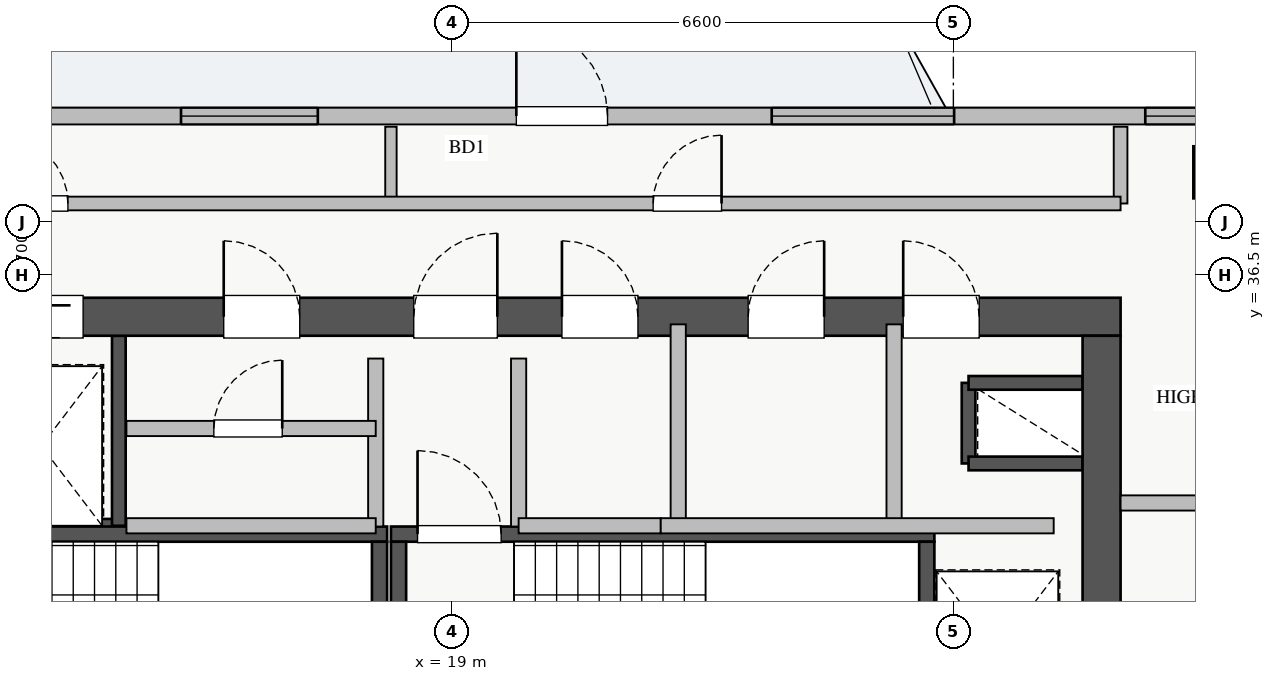
"""IFC4 building model, lengths in metres.
Left out: names, types, materials, properties, quantities, classifications, styles, units other than length and angle.
Written with IfcOpenShell. Run it as: python <this file> out.ifc"""

import sys

from ifc_helpers import new_model, si_unit, direction, frame, frame_2d, origin, origin_2d, place, context, subcontext, project, spatial, rectangle, extrude, source, transform, mapped, element, fill, save


model = new_model("IFC4")
c1 = context("Model", 3, precision=1e-05, world=origin(), true_north=direction((0.0, 1.0)))
c2 = subcontext(c1, "Body", "Model", "MODEL_VIEW")
j1 = project(units=[si_unit("LENGTHUNIT", "METRE"), si_unit("PLANEANGLEUNIT", "RADIAN")], contexts=[c1])
p1 = place(None, origin())
s1 = spatial("IfcSite", under=j1, at=p1, CompositionType="ELEMENT")
p2 = place(p1, origin())
s2 = spatial("IfcBuilding", under=s1, at=p2, CompositionType="ELEMENT")
p3 = place(p2, frame((0.0, 0.0, 250.25)))
s3 = spatial("IfcBuildingStorey", under=s2, at=p3, CompositionType="ELEMENT", Elevation=250.25)
p4 = place(p3, frame((12.68, 33.2, 0.0), z_axis=(0.0, 0.0, 1.0), x_axis=(1.0, 0.0, 0.0)))
e1 = element("IfcWall", 1, at=p4, inside=s3, PredefinedType="SHEAR", context=c2, shape_type="SweptSolid", body=[
    extrude(rectangle(XDim=1.94, YDim=0.18, at=frame_2d((0.97, 0.0))), origin(), (0.0, 0.0, 1.0), 3.07),
])
p5 = place(p3, frame((14.62, 33.2, 0.0), z_axis=(0.0, 0.0, 1.0), x_axis=(0.0, 1.0, 0.0)))
e2 = element("IfcWall", 2, at=p5, inside=s3, PredefinedType="SHEAR", context=c2, shape_type="SweptSolid", body=[
    extrude(rectangle(XDim=2.5, YDim=0.18, at=frame_2d((1.25, 0.0))), origin(), (0.0, 0.0, 1.0), 3.07),
])
p6 = place(p3, frame((25.8, 34.02, 0.0), z_axis=(0.0, 0.0, 1.0), x_axis=(0.0, 1.0, 0.0)))
e3 = element("IfcWall", 3, at=p6, inside=s3, PredefinedType="SHEAR", context=c2, shape_type="SweptSolid", body=[
    extrude(rectangle(XDim=1.06, YDim=0.18, at=frame_2d((0.53, 0.0))), origin(), (0.0, 0.0, 1.0), 3.07),
])
for number, where, z_axis, x_axis in (
    (4, (25.8, 35.08, 0.0), (0.0, 0.0, 1.0), (1.0, 0.0, 0.0)),
    (5, (25.8, 34.02, 0.0), (0.0, 0.0, 1.0), (1.0, 0.0, 0.0)),
):
    element("IfcWall", number, at=place(p3, frame(where, z_axis=z_axis, x_axis=x_axis)), inside=s3, PredefinedType="SHEAR", context=c2, shape_type="SweptSolid", body=[
        extrude(rectangle(XDim=1.5, YDim=0.18, at=frame_2d((0.75, 0.0))), origin(), (0.0, 0.0, 1.0), 3.07),
    ])
p7 = place(p3, frame((10.7, 33.09, 0.0), z_axis=(0.0, 0.0, 1.0), x_axis=(1.0, 0.0, 0.0)))
e6 = element("IfcWall", 6, at=p7, inside=s3, PredefinedType="SHEAR", context=c2, shape_type="SweptSolid", body=[
    extrude(rectangle(XDim=7.45, YDim=0.2, at=frame_2d((3.725, 0.0))), origin(), (0.0, 0.0, 1.0), 3.25),
])
p8 = place(p7, frame((0.35, 0.0, 0.0)))
e7 = element("IfcOpeningElement", 7, at=p8, cuts=e6, PredefinedType="OPENING", context=c2, shape_type="SweptSolid", body=[
    extrude(rectangle(XDim=1.1, YDim=2.05, at=frame_2d((0.55, 1.025))), frame((0.0, 0.11, 0.0), z_axis=(0.0, -1.0, 0.0), x_axis=(1.0, 0.0, 0.0)), (0.0, 0.0, 1.0), 0.22),
])
p9 = place(p3, frame((18.05, 30.05, 0.0), z_axis=(0.0, 0.0, 1.0), x_axis=(0.0, 1.0, 0.0)))
e8 = element("IfcWall", 8, at=p9, inside=s3, PredefinedType="SHEAR", context=c2, shape_type="SweptSolid", body=[
    extrude(rectangle(XDim=2.94, YDim=0.2, at=frame_2d((1.47, 0.0))), origin(), (0.0, 0.0, 1.0), 3.25),
])
p10 = place(p3, frame((18.2, 33.09, 0.0), z_axis=(0.0, 0.0, 1.0), x_axis=(1.0, 0.0, 0.0)))
e9 = element("IfcWall", 9, at=p10, inside=s3, PredefinedType="SHEAR", context=c2, shape_type="SweptSolid", body=[
    extrude(rectangle(XDim=7.15, YDim=0.2, at=frame_2d((3.575, 0.0))), origin(), (0.0, 0.0, 1.0), 3.25),
])
p11 = place(p10, frame((0.35, 0.0, 0.0)))
e10 = element("IfcOpeningElement", 10, at=p11, cuts=e9, PredefinedType="OPENING", context=c2, shape_type="SweptSolid", body=[
    extrude(rectangle(XDim=1.1, YDim=2.05, at=frame_2d((0.55, 1.025))), frame((0.0, 0.11, 0.0), z_axis=(0.0, -1.0, 0.0), x_axis=(1.0, 0.0, 0.0)), (0.0, 0.0, 1.0), 0.22),
])
for number, where, z_axis, x_axis in (
    (11, (18.3, 30.05, 0.0), (0.0, 0.0, 1.0), (0.0, 1.0, 0.0)),
    (12, (25.25, 30.05, 0.0), (0.0, 0.0, 1.0), (0.0, 1.0, 0.0)),
):
    element("IfcWall", number, at=place(p3, frame(where, z_axis=z_axis, x_axis=x_axis)), inside=s3, PredefinedType="SHEAR", context=c2, shape_type="SweptSolid", body=[
        extrude(rectangle(XDim=2.94, YDim=0.2, at=frame_2d((1.47, 0.0))), origin(), (0.0, 0.0, 1.0), 3.25),
    ])
p12 = place(p3, frame((10.2, 35.95, 0.0), z_axis=(0.0, 0.0, 1.0), x_axis=(1.0, 0.0, 0.0)))
e13 = element("IfcWall", 13, at=p12, inside=s3, PredefinedType="SHEAR", context=c2, shape_type="SweptSolid", body=[
    extrude(rectangle(XDim=17.6, YDim=0.5, at=frame_2d((8.8, 0.0))), origin(), (0.0, 0.0, 1.0), 3.25),
])
p13 = place(p12, frame((1.15, 0.0, 0.0)))
e14 = element("IfcOpeningElement", 14, at=p13, cuts=e13, PredefinedType="OPENING", context=c2, shape_type="SweptSolid", body=[
    extrude(rectangle(XDim=1.1, YDim=2.05, at=frame_2d((0.55, 1.025))), frame((0.0, 0.26, 0.0), z_axis=(0.0, -1.0, 0.0), x_axis=(1.0, 0.0, 0.0)), (0.0, 0.0, 1.0), 0.52),
])
p14 = place(p12, frame((8.3, 0.0, 0.0)))
e15 = element("IfcOpeningElement", 15, at=p14, cuts=e13, PredefinedType="OPENING", context=c2, shape_type="SweptSolid", body=[
    extrude(rectangle(XDim=1.1, YDim=2.05, at=frame_2d((0.55, 1.025))), frame((0.0, 0.26, 0.0), z_axis=(0.0, -1.0, 0.0), x_axis=(1.0, 0.0, 0.0)), (0.0, 0.0, 1.0), 0.52),
])
p15 = place(p12, frame((2.85, 0.0, 0.0)))
e16 = element("IfcOpeningElement", 16, at=p15, cuts=e13, PredefinedType="OPENING", context=c2, shape_type="SweptSolid", body=[
    extrude(rectangle(XDim=1.1, YDim=2.05, at=frame_2d((0.55, 1.025))), frame((0.0, 0.26, 0.0), z_axis=(0.0, -1.0, 0.0), x_axis=(1.0, 0.0, 0.0)), (0.0, 0.0, 1.0), 0.52),
])
p16 = place(p12, frame((5.8, 0.0, 0.0)))
e17 = element("IfcOpeningElement", 17, at=p16, cuts=e13, PredefinedType="OPENING", context=c2, shape_type="SweptSolid", body=[
    extrude(rectangle(XDim=1.0, YDim=2.05, at=frame_2d((0.5, 1.025))), frame((0.0, 0.26, 0.0), z_axis=(0.0, -1.0, 0.0), x_axis=(1.0, 0.0, 0.0)), (0.0, 0.0, 1.0), 0.52),
])
p17 = place(p12, frame((14.74, 0.0, 0.0)))
e18 = element("IfcOpeningElement", 18, at=p17, cuts=e13, PredefinedType="OPENING", context=c2, shape_type="SweptSolid", body=[
    extrude(rectangle(XDim=1.0, YDim=2.05, at=frame_2d((0.5, 1.025))), frame((0.0, 0.26, 0.0), z_axis=(0.0, -1.0, 0.0), x_axis=(1.0, 0.0, 0.0)), (0.0, 0.0, 1.0), 0.52),
])
p18 = place(p12, frame((10.25, 0.0, 0.0)))
e19 = element("IfcOpeningElement", 19, at=p18, cuts=e13, PredefinedType="OPENING", context=c2, shape_type="SweptSolid", body=[
    extrude(rectangle(XDim=1.0, YDim=2.05, at=frame_2d((0.5, 1.025))), frame((0.0, 0.26, 0.0), z_axis=(0.0, -1.0, 0.0), x_axis=(1.0, 0.0, 0.0)), (0.0, 0.0, 1.0), 0.52),
])
p19 = place(p12, frame((12.7, 0.0, 0.0)))
e20 = element("IfcOpeningElement", 20, at=p19, cuts=e13, PredefinedType="OPENING", context=c2, shape_type="SweptSolid", body=[
    extrude(rectangle(XDim=1.0, YDim=2.05, at=frame_2d((0.5, 1.025))), frame((0.0, 0.26, 0.0), z_axis=(0.0, -1.0, 0.0), x_axis=(1.0, 0.0, 0.0)), (0.0, 0.0, 1.0), 0.52),
])
p20 = place(p3, frame((27.55, 29.5, 0.0), z_axis=(0.0, 0.0, 1.0), x_axis=(0.0, 1.0, 0.0)))
e21 = element("IfcWall", 21, at=p20, inside=s3, PredefinedType="SHEAR", context=c2, shape_type="SweptSolid", body=[
    extrude(rectangle(XDim=6.2, YDim=0.5, at=frame_2d((3.1, 0.0))), origin(), (0.0, 0.0, 1.0), 3.25),
])
p21 = place(p20, frame((1.1, 0.0, 0.0)))
e22 = element("IfcOpeningElement", 22, at=p21, cuts=e21, PredefinedType="OPENING", context=c2, shape_type="SweptSolid", body=[
    extrude(rectangle(XDim=1.3, YDim=2.05, at=frame_2d((0.65, 1.025))), frame((0.0, 0.26, 0.0), z_axis=(0.0, -1.0, 0.0), x_axis=(1.0, 0.0, 0.0)), (0.0, 0.0, 1.0), 0.52),
])
m1 = source(origin(), c2, "Body", "SweptSolid", [
    extrude(rectangle(XDim=0.65, YDim=0.65, at=origin_2d()), origin(), (0.0, 0.0, 1.0), 3.25),
])
p22 = place(p3, frame((29.1, 37.85, 0.0), z_axis=(0.0, 0.0, 1.0), x_axis=(1.0, 0.0, 0.0)))
e23 = element("IfcColumn", 23, at=p22, inside=s3, PredefinedType="COLUMN", context=c2, shape_type="MappedRepresentation", body=[
    mapped(m1, transform((0.0, 0.0, 0.0), x_axis=(1.0, 0.0, 0.0), y_axis=(0.0, 1.0, 0.0), z_axis=(0.0, 0.0, 1.0), scale=1.0)),
])
p23 = place(p3, frame((8.35, 38.59, 0.0), z_axis=(0.0, 0.0, 1.0), x_axis=(1.0, 0.0, 0.0)))
e24 = element("IfcWall", 24, at=p23, inside=s3, PredefinedType="STANDARD", context=c2, shape_type="SweptSolid", body=[
    extrude(rectangle(XDim=21.3, YDim=0.22, at=frame_2d((10.65, 0.0))), origin(), (0.0, 0.0, 1.0), 2.61),
])
p24 = place(p23, frame((11.5, 0.0, 0.0)))
e25 = element("IfcOpeningElement", 25, at=p24, cuts=e24, PredefinedType="OPENING", context=c2, shape_type="SweptSolid", body=[
    extrude(rectangle(XDim=1.2, YDim=2.1, at=frame_2d((0.6, 1.05))), frame((0.0, 0.12, 0.0), z_axis=(0.0, -1.0, 0.0), x_axis=(1.0, 0.0, 0.0)), (0.0, 0.0, 1.0), 0.24),
])
p25 = place(p23, frame((1.463, 0.0, 0.9)))
e26 = element("IfcOpeningElement", 26, at=p25, cuts=e24, PredefinedType="OPENING", context=c2, shape_type="SweptSolid", body=[
    extrude(rectangle(XDim=2.4, YDim=1.48, at=frame_2d((1.2, 0.74))), frame((0.0, 0.12, 0.0), z_axis=(0.0, -1.0, 0.0), x_axis=(1.0, 0.0, 0.0)), (0.0, 0.0, 1.0), 0.24),
])
p26 = place(p23, frame((7.088, 0.0, 0.9)))
e27 = element("IfcOpeningElement", 27, at=p26, cuts=e24, PredefinedType="OPENING", context=c2, shape_type="SweptSolid", body=[
    extrude(rectangle(XDim=1.8, YDim=1.45, at=frame_2d((0.9, 0.725))), frame((0.0, 0.12, 0.0), z_axis=(0.0, -1.0, 0.0), x_axis=(1.0, 0.0, 0.0)), (0.0, 0.0, 1.0), 0.24),
])
p27 = place(p23, frame((19.775, 0.0, 0.9)))
e28 = element("IfcOpeningElement", 28, at=p27, cuts=e24, PredefinedType="OPENING", context=c2, shape_type="SweptSolid", body=[
    extrude(rectangle(XDim=1.2, YDim=1.4, at=frame_2d((0.6, 0.7))), frame((0.0, 0.12, 0.0), z_axis=(0.0, -1.0, 0.0), x_axis=(1.0, 0.0, 0.0)), (0.0, 0.0, 1.0), 0.24),
])
p28 = place(p23, frame((14.86, 0.0, 0.9)))
e29 = element("IfcOpeningElement", 29, at=p28, cuts=e24, PredefinedType="OPENING", context=c2, shape_type="SweptSolid", body=[
    extrude(rectangle(XDim=2.4, YDim=1.5, at=frame_2d((1.2, 0.75))), frame((0.0, 0.12, 0.0), z_axis=(0.0, -1.0, 0.0), x_axis=(1.0, 0.0, 0.0)), (0.0, 0.0, 1.0), 0.24),
])
p29 = place(p3, frame((27.8, 33.5, 0.0), z_axis=(0.0, 0.0, 1.0), x_axis=(1.0, 0.0, 0.0)))
e30 = element("IfcWall", 30, at=p29, inside=s3, PredefinedType="PARTITIONING", context=c2, shape_type="SweptSolid", body=[
    extrude(rectangle(XDim=3.1, YDim=0.2, at=frame_2d((1.55, 0.0))), origin(), (0.0, 0.0, 1.0), 3.07),
])
for number, where, z_axis, x_axis in (
    (31, (18.0, 33.19, 0.0), (0.0, 0.0, 1.0), (0.0, 1.0, 0.0)),
    (32, (19.88, 33.19, 0.0), (0.0, 0.0, 1.0), (0.0, 1.0, 0.0)),
):
    element("IfcWall", number, at=place(p3, frame(where, z_axis=z_axis, x_axis=x_axis)), inside=s3, PredefinedType="PARTITIONING", context=c2, shape_type="SweptSolid", body=[
        extrude(rectangle(XDim=2.21, YDim=0.2, at=frame_2d((1.105, 0.0))), origin(), (0.0, 0.0, 1.0), 3.07),
    ])
p30 = place(p3, frame((14.72, 34.48, 0.0), z_axis=(0.0, 0.0, 1.0), x_axis=(1.0, 0.0, 0.0)))
e33 = element("IfcWall", 33, at=p30, inside=s3, PredefinedType="PARTITIONING", context=c2, shape_type="SweptSolid", body=[
    extrude(rectangle(XDim=3.28, YDim=0.2, at=frame_2d((1.64, 0.0))), origin(), (0.0, 0.0, 1.0), 3.07),
])
p31 = place(p30, frame((1.15, 0.0, 0.0)))
e34 = element("IfcOpeningElement", 34, at=p31, cuts=e33, PredefinedType="OPENING", context=c2, shape_type="SweptSolid", body=[
    extrude(rectangle(XDim=0.9, YDim=2.05, at=frame_2d((0.45, 1.025))), frame((0.0, 0.11, 0.0), z_axis=(0.0, -1.0, 0.0), x_axis=(1.0, 0.0, 0.0)), (0.0, 0.0, 1.0), 0.22),
])
p32 = place(p3, frame((14.72, 33.2, 0.0), z_axis=(0.0, 0.0, 1.0), x_axis=(1.0, 0.0, 0.0)))
e35 = element("IfcWall", 35, at=p32, inside=s3, PredefinedType="PARTITIONING", context=c2, shape_type="SweptSolid", body=[
    extrude(rectangle(XDim=3.28, YDim=0.2, at=frame_2d((1.64, 0.0))), origin(), (0.0, 0.0, 1.0), 3.07),
])
p33 = place(p3, frame((24.82, 33.2, 0.0), z_axis=(0.0, 0.0, 1.0), x_axis=(0.0, 1.0, 0.0)))
e36 = element("IfcWall", 36, at=p33, inside=s3, PredefinedType="PARTITIONING", context=c2, shape_type="SweptSolid", body=[
    extrude(rectangle(XDim=2.65, YDim=0.2, at=frame_2d((1.325, 0.0))), origin(), (0.0, 0.0, 1.0), 3.07),
])
p34 = place(p3, frame((19.88, 33.2, 0.0), z_axis=(0.0, 0.0, 1.0), x_axis=(1.0, 0.0, 0.0)))
e37 = element("IfcWall", 37, at=p34, inside=s3, PredefinedType="PARTITIONING", context=c2, shape_type="SweptSolid", body=[
    extrude(rectangle(XDim=1.87, YDim=0.2, at=frame_2d((0.935, 0.0))), origin(), (0.0, 0.0, 1.0), 3.07),
])
p35 = place(p3, frame((21.98, 33.2, 0.0), z_axis=(0.0, 0.0, 1.0), x_axis=(0.0, 1.0, 0.0)))
e38 = element("IfcWall", 38, at=p35, inside=s3, PredefinedType="PARTITIONING", context=c2, shape_type="SweptSolid", body=[
    extrude(rectangle(XDim=2.65, YDim=0.2, at=frame_2d((1.325, 0.0))), origin(), (0.0, 0.0, 1.0), 3.07),
])
p36 = place(p3, frame((21.75, 33.2, 0.0), z_axis=(0.0, 0.0, 1.0), x_axis=(1.0, 0.0, 0.0)))
e39 = element("IfcWall", 39, at=p36, inside=s3, PredefinedType="PARTITIONING", context=c2, shape_type="SweptSolid", body=[
    extrude(rectangle(XDim=5.17, YDim=0.2, at=frame_2d((2.585, 0.0))), origin(), (0.0, 0.0, 1.0), 3.07),
])
p37 = place(p3, frame((27.8, 37.44, 0.0), z_axis=(0.0, 0.0, 1.0), x_axis=(0.0, 1.0, 0.0)))
e40 = element("IfcWall", 40, at=p37, inside=s3, PredefinedType="PARTITIONING", context=c2, shape_type="SweptSolid", body=[
    extrude(rectangle(XDim=1.01, YDim=0.18, at=frame_2d((0.505, 0.0))), origin(), (0.0, 0.0, 1.0), 3.07),
])
p38 = place(p3, frame((18.2, 37.44, 0.0), z_axis=(0.0, 0.0, 1.0), x_axis=(0.0, 1.0, 0.0)))
e41 = element("IfcWall", 41, at=p38, inside=s3, PredefinedType="PARTITIONING", context=c2, shape_type="SweptSolid", body=[
    extrude(rectangle(XDim=1.01, YDim=0.15, at=frame_2d((0.505, 0.0))), origin(), (0.0, 0.0, 1.0), 3.07),
])
p39 = place(p3, frame((8.85, 37.44, 0.0), z_axis=(0.0, 0.0, 1.0), x_axis=(1.0, 0.0, 0.0)))
e42 = element("IfcWall", 42, at=p39, inside=s3, PredefinedType="PARTITIONING", context=c2, shape_type="SweptSolid", body=[
    extrude(rectangle(XDim=18.95, YDim=0.18, at=frame_2d((9.475, 0.0))), origin(), (0.0, 0.0, 1.0), 3.07),
])
p40 = place(p39, frame((4.2, 0.0, 0.0)))
e43 = element("IfcOpeningElement", 43, at=p40, cuts=e42, PredefinedType="OPENING", context=c2, shape_type="SweptSolid", body=[
    extrude(rectangle(XDim=0.9, YDim=2.05, at=frame_2d((0.45, 1.025))), frame((0.0, 0.1, 0.0), z_axis=(0.0, -1.0, 0.0), x_axis=(1.0, 0.0, 0.0)), (0.0, 0.0, 1.0), 0.2),
])
p41 = place(p39, frame((12.8, 0.0, 0.0)))
e44 = element("IfcOpeningElement", 44, at=p41, cuts=e42, PredefinedType="OPENING", context=c2, shape_type="SweptSolid", body=[
    extrude(rectangle(XDim=0.9, YDim=2.05, at=frame_2d((0.45, 1.025))), frame((0.0, 0.1, 0.0), z_axis=(0.0, -1.0, 0.0), x_axis=(1.0, 0.0, 0.0)), (0.0, 0.0, 1.0), 0.2),
])
m2 = source(origin(), c2, "Body", "SweptSolid", [
    extrude(rectangle(XDim=1.2, YDim=2.1, at=frame_2d((0.6, 1.05))), frame((0.0, 0.025, 0.0), z_axis=(0.0, -1.0, 0.0), x_axis=(1.0, 0.0, 0.0)), (0.0, 0.0, 1.0), 0.05),
])
p42 = place(p24, origin())
e45 = element("IfcDoor", 45, at=p42, inside=s3, OperationType="SINGLE_SWING_LEFT", PredefinedType="DOOR", context=c2, shape_type="MappedRepresentation", body=[
    mapped(m2, transform((0.0, 0.0, 0.0), x_axis=(1.0, 0.0, 0.0), y_axis=(0.0, 1.0, 0.0), z_axis=(0.0, 0.0, 1.0), scale=1.0)),
])
fill(e25, e45)
m3 = source(origin(), c2, "Body", "SweptSolid", [
    extrude(rectangle(XDim=1.8, YDim=1.45, at=frame_2d((0.9, 0.725))), frame((0.0, 0.03, 0.0), z_axis=(0.0, -1.0, 0.0), x_axis=(1.0, 0.0, 0.0)), (0.0, 0.0, 1.0), 0.06),
])
p43 = place(p26, origin())
e46 = element("IfcWindow", 46, at=p43, inside=s3, PartitioningType="DOUBLE_PANEL_VERTICAL", PredefinedType="WINDOW", context=c2, shape_type="MappedRepresentation", body=[
    mapped(m3, transform((0.0, 0.0, 0.0), x_axis=(1.0, 0.0, 0.0), y_axis=(0.0, 1.0, 0.0), z_axis=(0.0, 0.0, 1.0), scale=1.0)),
])
fill(e27, e46)
m4 = source(origin(), c2, "Body", "SweptSolid", [
    extrude(rectangle(XDim=1.2, YDim=1.4, at=frame_2d((0.6, 0.7))), frame((0.0, 0.03, 0.0), z_axis=(0.0, -1.0, 0.0), x_axis=(1.0, 0.0, 0.0)), (0.0, 0.0, 1.0), 0.06),
])
p44 = place(p27, origin())
e47 = element("IfcWindow", 47, at=p44, inside=s3, PartitioningType="TRIPLE_PANEL_VERTICAL", PredefinedType="WINDOW", context=c2, shape_type="MappedRepresentation", body=[
    mapped(m4, transform((0.0, 0.0, 0.0), x_axis=(1.0, 0.0, 0.0), y_axis=(0.0, 1.0, 0.0), z_axis=(0.0, 0.0, 1.0), scale=1.0)),
])
fill(e28, e47)
m5 = source(origin(), c2, "Body", "SweptSolid", [
    extrude(rectangle(XDim=1.1, YDim=2.05, at=frame_2d((0.55, 1.025))), frame((0.0, 0.025, 0.0), z_axis=(0.0, -1.0, 0.0), x_axis=(1.0, 0.0, 0.0)), (0.0, 0.0, 1.0), 0.05),
])
p45 = place(p14, origin())
e48 = element("IfcDoor", 48, at=p45, inside=s3, OperationType="SINGLE_SWING_RIGHT", PredefinedType="DOOR", context=c2, shape_type="MappedRepresentation", body=[
    mapped(m5, transform((0.0, 0.0, 0.0), x_axis=(1.0, 0.0, 0.0), y_axis=(0.0, 1.0, 0.0), z_axis=(0.0, 0.0, 1.0), scale=1.0)),
])
fill(e15, e48)
p46 = place(p11, origin())
e49 = element("IfcDoor", 49, at=p46, inside=s3, OperationType="SINGLE_SWING_LEFT", PredefinedType="DOOR", context=c2, shape_type="MappedRepresentation", body=[
    mapped(m5, transform((0.0, 0.0, 0.0), x_axis=(1.0, 0.0, 0.0), y_axis=(0.0, 1.0, 0.0), z_axis=(0.0, 0.0, 1.0), scale=1.0)),
])
fill(e10, e49)
p47 = place(p15, origin())
e50 = element("IfcDoor", 50, at=p47, inside=s3, OperationType="SLIDING_TO_LEFT", PredefinedType="DOOR", context=c2, shape_type="MappedRepresentation", body=[
    mapped(m5, transform((0.0, 0.0, 0.0), x_axis=(1.0, 0.0, 0.0), y_axis=(0.0, 1.0, 0.0), z_axis=(0.0, 0.0, 1.0), scale=1.0)),
])
fill(e16, e50)
m6 = source(origin(), c2, "Body", "SweptSolid", [
    extrude(rectangle(XDim=1.0, YDim=2.05, at=frame_2d((0.5, 1.025))), frame((0.0, 0.025, 0.0), z_axis=(0.0, -1.0, 0.0), x_axis=(1.0, 0.0, 0.0)), (0.0, 0.0, 1.0), 0.05),
])
p48 = place(p16, origin())
e51 = element("IfcDoor", 51, at=p48, inside=s3, OperationType="SINGLE_SWING_LEFT", PredefinedType="DOOR", context=c2, shape_type="MappedRepresentation", body=[
    mapped(m6, transform((0.0, 0.0, 0.0), x_axis=(1.0, 0.0, 0.0), y_axis=(0.0, 1.0, 0.0), z_axis=(0.0, 0.0, 1.0), scale=1.0)),
])
fill(e17, e51)
p49 = place(p17, origin())
e52 = element("IfcDoor", 52, at=p49, inside=s3, OperationType="SINGLE_SWING_LEFT", PredefinedType="DOOR", context=c2, shape_type="MappedRepresentation", body=[
    mapped(m6, transform((0.0, 0.0, 0.0), x_axis=(1.0, 0.0, 0.0), y_axis=(0.0, 1.0, 0.0), z_axis=(0.0, 0.0, 1.0), scale=1.0)),
])
fill(e18, e52)
p50 = place(p18, origin())
e53 = element("IfcDoor", 53, at=p50, inside=s3, OperationType="SINGLE_SWING_LEFT", PredefinedType="DOOR", context=c2, shape_type="MappedRepresentation", body=[
    mapped(m6, transform((0.0, 0.0, 0.0), x_axis=(1.0, 0.0, 0.0), y_axis=(0.0, 1.0, 0.0), z_axis=(0.0, 0.0, 1.0), scale=1.0)),
])
fill(e19, e53)
p51 = place(p19, origin())
e54 = element("IfcDoor", 54, at=p51, inside=s3, OperationType="SINGLE_SWING_RIGHT", PredefinedType="DOOR", context=c2, shape_type="MappedRepresentation", body=[
    mapped(m6, transform((0.0, 0.0, 0.0), x_axis=(1.0, 0.0, 0.0), y_axis=(0.0, 1.0, 0.0), z_axis=(0.0, 0.0, 1.0), scale=1.0)),
])
fill(e20, e54)
m7 = source(origin(), c2, "Body", "SweptSolid", [
    extrude(rectangle(XDim=0.9, YDim=2.05, at=frame_2d((0.45, 1.025))), frame((0.0, 0.025, 0.0), z_axis=(0.0, -1.0, 0.0), x_axis=(1.0, 0.0, 0.0)), (0.0, 0.0, 1.0), 0.05),
])
p52 = place(p31, origin())
e55 = element("IfcDoor", 55, at=p52, inside=s3, OperationType="SINGLE_SWING_RIGHT", PredefinedType="DOOR", context=c2, shape_type="MappedRepresentation", body=[
    mapped(m7, transform((0.0, 0.0, 0.0), x_axis=(1.0, 0.0, 0.0), y_axis=(0.0, 1.0, 0.0), z_axis=(0.0, 0.0, 1.0), scale=1.0)),
])
fill(e34, e55)
p53 = place(p40, origin())
e56 = element("IfcDoor", 56, at=p53, inside=s3, OperationType="SINGLE_SWING_LEFT", PredefinedType="DOOR", context=c2, shape_type="MappedRepresentation", body=[
    mapped(m7, transform((0.0, 0.0, 0.0), x_axis=(1.0, 0.0, 0.0), y_axis=(0.0, 1.0, 0.0), z_axis=(0.0, 0.0, 1.0), scale=1.0)),
])
fill(e43, e56)
p54 = place(p41, origin())
e57 = element("IfcDoor", 57, at=p54, inside=s3, OperationType="SINGLE_SWING_RIGHT", PredefinedType="DOOR", context=c2, shape_type="MappedRepresentation", body=[
    mapped(m7, transform((0.0, 0.0, 0.0), x_axis=(1.0, 0.0, 0.0), y_axis=(0.0, 1.0, 0.0), z_axis=(0.0, 0.0, 1.0), scale=1.0)),
])
fill(e44, e57)
m8 = source(origin(), c2, "Body", "SweptSolid", [
    extrude(rectangle(XDim=2.4, YDim=1.5, at=frame_2d((1.2, 0.75))), frame((0.0, 0.03, 0.0), z_axis=(0.0, -1.0, 0.0), x_axis=(1.0, 0.0, 0.0)), (0.0, 0.0, 1.0), 0.06),
])
p55 = place(p28, origin())
e58 = element("IfcWindow", 58, at=p55, inside=s3, PartitioningType="TRIPLE_PANEL_VERTICAL", PredefinedType="WINDOW", context=c2, shape_type="MappedRepresentation", body=[
    mapped(m8, transform((0.0, 0.0, 0.0), x_axis=(1.0, 0.0, 0.0), y_axis=(0.0, 1.0, 0.0), z_axis=(0.0, 0.0, 1.0), scale=1.0)),
])
fill(e29, e58)
save(model, sys.argv[1])
